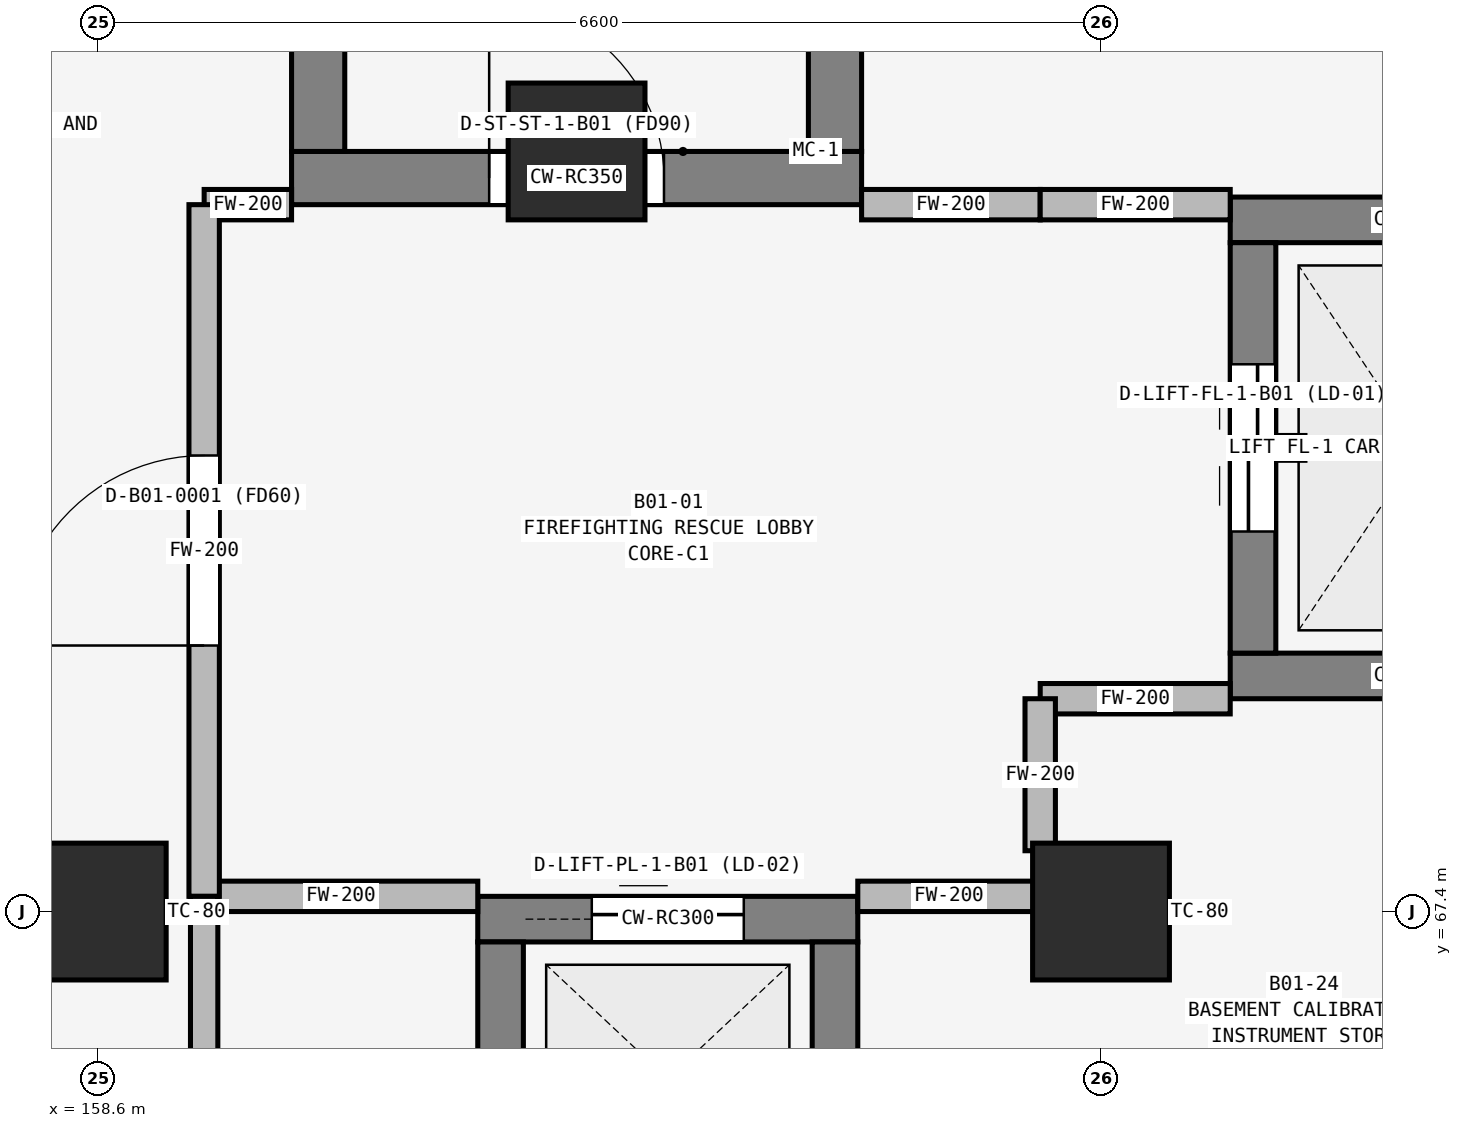
"""IFC4 building model, lengths in metres.
Left out: names, types, materials, properties, quantities, classifications, styles, units other than length and angle.
Written with IfcOpenShell. Run it as: python <this file> out.ifc"""

import sys

from ifc_helpers import new_model, si_unit, direction, frame, frame_2d, origin, origin_2d, place, context, subcontext, project, spatial, rectangle, extrude, element, fill, save


model = new_model("IFC4")
c1 = context("Model", 3, precision=1e-05, world=origin(), true_north=direction((0.0, 1.0)))
c2 = subcontext(c1, "Body", "Model", "MODEL_VIEW")
j1 = project(units=[si_unit("LENGTHUNIT", "METRE"), si_unit("PLANEANGLEUNIT", "RADIAN")], contexts=[c1])
p1 = place(None, origin())
s1 = spatial("IfcSite", under=j1, at=p1, CompositionType="ELEMENT")
p2 = place(p1, origin())
s2 = spatial("IfcBuilding", under=s1, at=p2, CompositionType="ELEMENT")
p3 = place(p2, frame((0.0, 0.0, -4.5)))
s3 = spatial("IfcBuildingStorey", under=s2, at=p3, CompositionType="ELEMENT", Elevation=-4.5)
for number, where, z_axis, x_axis in (
    (1, (158.6, 67.4, 0.0), (0.0, 0.0, 1.0), (1.0, 0.0, 0.0)),
    (2, (165.2, 67.4, 0.0), (0.0, 0.0, 1.0), (1.0, 0.0, 0.0)),
):
    element("IfcColumn", number, at=place(p3, frame(where, z_axis=z_axis, x_axis=x_axis)), inside=s3, PredefinedType="COLUMN", context=c2, shape_type="SweptSolid", body=[
        extrude(rectangle(XDim=0.8, YDim=0.8, at=origin_2d()), origin(), (0.0, 0.0, 1.0), 4.5),
    ])
p4 = place(p3, frame((159.875, 72.225, 0.0), z_axis=(0.0, 0.0, 1.0), x_axis=(1.0, 0.0, 0.0)))
e3 = element("IfcWall", 3, at=p4, inside=s3, PredefinedType="SHEAR", context=c2, shape_type="SweptSolid", body=[
    extrude(rectangle(XDim=3.75, YDim=0.35, at=frame_2d((1.875, 0.0))), origin(), (0.0, 0.0, 1.0), 4.5),
])
p5 = place(p4, frame((1.3, 0.0, 0.0)))
e4 = element("IfcOpeningElement", 4, at=p5, cuts=e3, PredefinedType="OPENING", context=c2, shape_type="SweptSolid", body=[
    extrude(rectangle(XDim=1.15, YDim=2.15, at=frame_2d((0.575, 1.075))), frame((0.0, 0.185, 0.0), z_axis=(0.0, -1.0, 0.0), x_axis=(1.0, 0.0, 0.0)), (0.0, 0.0, 1.0), 0.37),
])
for number, where, z_axis, x_axis in (
    (5, (160.05, 72.4, 0.0), (0.0, 0.0, 1.0), (0.0, 1.0, 0.0)),
    (6, (163.45, 72.4, 0.0), (0.0, 0.0, 1.0), (0.0, 1.0, 0.0)),
):
    element("IfcWall", number, at=place(p3, frame(where, z_axis=z_axis, x_axis=x_axis)), inside=s3, PredefinedType="SHEAR", context=c2, shape_type="SweptSolid", body=[
        extrude(rectangle(XDim=7.375, YDim=0.35, at=frame_2d((3.688, 0.0))), origin(), (0.0, 0.0, 1.0), 4.5),
    ])
for number, where, z_axis, x_axis in (
    (7, (166.05, 68.95, -0.82), (0.0, 0.0, 1.0), (1.0, 0.0, 0.0)),
    (8, (166.05, 71.95, -0.82), (0.0, 0.0, 1.0), (1.0, 0.0, 0.0)),
):
    element("IfcWall", number, at=place(p3, frame(where, z_axis=z_axis, x_axis=x_axis)), inside=s3, PredefinedType="SHEAR", context=c2, shape_type="SweptSolid", body=[
        extrude(rectangle(XDim=2.5, YDim=0.3, at=frame_2d((1.25, 0.0))), origin(), (0.0, 0.0, 1.0), 5.32),
    ])
p6 = place(p3, frame((166.2, 69.1, -0.82), z_axis=(0.0, 0.0, 1.0), x_axis=(0.0, 1.0, 0.0)))
e9 = element("IfcWall", 9, at=p6, inside=s3, PredefinedType="SHEAR", context=c2, shape_type="SweptSolid", body=[
    extrude(rectangle(XDim=2.7, YDim=0.3, at=frame_2d((1.35, 0.0))), origin(), (0.0, 0.0, 1.0), 5.32),
])
p7 = place(p6, frame((0.8, 0.0, 0.82)))
e10 = element("IfcOpeningElement", 10, at=p7, cuts=e9, PredefinedType="OPENING", context=c2, shape_type="SweptSolid", body=[
    extrude(rectangle(XDim=1.1, YDim=2.1, at=frame_2d((0.55, 1.05))), frame((0.0, 0.16, 0.0), z_axis=(0.0, -1.0, 0.0), x_axis=(1.0, 0.0, 0.0)), (0.0, 0.0, 1.0), 0.32),
])
p8 = place(p3, frame((161.1, 67.35, -0.82), z_axis=(0.0, 0.0, 1.0), x_axis=(1.0, 0.0, 0.0)))
e11 = element("IfcWall", 11, at=p8, inside=s3, PredefinedType="SHEAR", context=c2, shape_type="SweptSolid", body=[
    extrude(rectangle(XDim=2.5, YDim=0.3, at=frame_2d((1.25, 0.0))), origin(), (0.0, 0.0, 1.0), 5.32),
])
p9 = place(p8, frame((0.75, 0.0, 0.82)))
e12 = element("IfcOpeningElement", 12, at=p9, cuts=e11, PredefinedType="OPENING", context=c2, shape_type="SweptSolid", body=[
    extrude(rectangle(XDim=1.0, YDim=2.1, at=frame_2d((0.5, 1.05))), frame((0.0, 0.16, 0.0), z_axis=(0.0, -1.0, 0.0), x_axis=(1.0, 0.0, 0.0)), (0.0, 0.0, 1.0), 0.32),
])
for number, where, z_axis, x_axis in (
    (13, (161.25, 65.4, -0.82), (0.0, 0.0, 1.0), (0.0, 1.0, 0.0)),
    (14, (163.45, 65.4, -0.82), (0.0, 0.0, 1.0), (0.0, 1.0, 0.0)),
):
    element("IfcWall", number, at=place(p3, frame(where, z_axis=z_axis, x_axis=x_axis)), inside=s3, PredefinedType="SHEAR", context=c2, shape_type="SweptSolid", body=[
        extrude(rectangle(XDim=1.8, YDim=0.3, at=frame_2d((0.9, 0.0))), origin(), (0.0, 0.0, 1.0), 5.32),
    ])
for number, where, z_axis, x_axis in (
    (15, (158.6, 67.4, -1.2), (0.0, 0.0, 1.0), (1.0, 0.0, 0.0)),
    (16, (161.75, 72.4, -1.2), (0.0, 0.0, 1.0), (1.0, 0.0, 0.0)),
    (17, (165.2, 67.4, -1.2), (0.0, 0.0, 1.0), (1.0, 0.0, 0.0)),
):
    element("IfcColumn", number, at=place(p3, frame(where, z_axis=z_axis, x_axis=x_axis)), inside=s3, PredefinedType="COLUMN", context=c2, shape_type="SweptSolid", body=[
        extrude(rectangle(XDim=0.9, YDim=0.9, at=origin_2d()), origin(), (0.0, 0.0, 1.0), 1.2),
    ])
p10 = place(p3, frame((159.3, 72.05, 0.0), z_axis=(0.0, 0.0, 1.0), x_axis=(1.0, 0.0, 0.0)))
e18 = element("IfcWall", 18, at=p10, inside=s3, PredefinedType="PARTITIONING", context=c2, shape_type="SweptSolid", body=[
    extrude(rectangle(XDim=0.575, YDim=0.2, at=frame_2d((0.288, 0.0))), origin(), (0.0, 0.0, 1.0), 4.175),
])
p11 = place(p3, frame((163.625, 72.05, 0.0), z_axis=(0.0, 0.0, 1.0), x_axis=(1.0, 0.0, 0.0)))
e19 = element("IfcWall", 19, at=p11, inside=s3, PredefinedType="PARTITIONING", context=c2, shape_type="SweptSolid", body=[
    extrude(rectangle(XDim=1.175, YDim=0.2, at=frame_2d((0.587, 0.0))), origin(), (0.0, 0.0, 1.0), 4.175),
])
for number, where, z_axis, x_axis in (
    (20, (164.8, 72.05, 0.0), (0.0, 0.0, 1.0), (1.0, 0.0, 0.0)),
    (21, (166.05, 68.8, 0.0), (0.0, 0.0, 1.0), (-1.0, 0.0, 0.0)),
):
    element("IfcWall", number, at=place(p3, frame(where, z_axis=z_axis, x_axis=x_axis)), inside=s3, PredefinedType="PARTITIONING", context=c2, shape_type="SweptSolid", body=[
        extrude(rectangle(XDim=1.25, YDim=0.2, at=frame_2d((0.625, 0.0))), origin(), (0.0, 0.0, 1.0), 3.635),
    ])
p12 = place(p3, frame((164.8, 68.8, 0.0), z_axis=(0.0, 0.0, 1.0), x_axis=(0.0, -1.0, 0.0)))
e22 = element("IfcWall", 22, at=p12, inside=s3, PredefinedType="PARTITIONING", context=c2, shape_type="SweptSolid", body=[
    extrude(rectangle(XDim=1.0, YDim=0.2, at=frame_2d((0.5, 0.0))), origin(), (0.0, 0.0, 1.0), 4.175),
])
p13 = place(p3, frame((164.8, 67.5, 0.0), z_axis=(0.0, 0.0, 1.0), x_axis=(-1.0, 0.0, 0.0)))
e23 = element("IfcWall", 23, at=p13, inside=s3, PredefinedType="PARTITIONING", context=c2, shape_type="SweptSolid", body=[
    extrude(rectangle(XDim=1.2, YDim=0.2, at=frame_2d((0.6, 0.0))), origin(), (0.0, 0.0, 1.0), 3.835),
])
p14 = place(p3, frame((161.1, 67.5, 0.0), z_axis=(0.0, 0.0, 1.0), x_axis=(-1.0, 0.0, 0.0)))
e24 = element("IfcWall", 24, at=p14, inside=s3, PredefinedType="PARTITIONING", context=c2, shape_type="SweptSolid", body=[
    extrude(rectangle(XDim=1.8, YDim=0.2, at=frame_2d((0.9, 0.0))), origin(), (0.0, 0.0, 1.0), 3.835),
])
p15 = place(p3, frame((159.3, 67.5, 0.0), z_axis=(0.0, 0.0, 1.0), x_axis=(0.0, 1.0, 0.0)))
e25 = element("IfcWall", 25, at=p15, inside=s3, PredefinedType="PARTITIONING", context=c2, shape_type="SweptSolid", body=[
    extrude(rectangle(XDim=4.55, YDim=0.2, at=frame_2d((2.275, 0.0))), origin(), (0.0, 0.0, 1.0), 3.835),
])
p16 = place(p15, frame((1.65, 0.0, 0.0)))
e26 = element("IfcOpeningElement", 26, at=p16, cuts=e25, PredefinedType="OPENING", context=c2, shape_type="SweptSolid", body=[
    extrude(rectangle(XDim=1.25, YDim=2.15, at=frame_2d((0.625, 1.075))), frame((0.0, 0.11, 0.0), z_axis=(0.0, -1.0, 0.0), x_axis=(1.0, 0.0, 0.0)), (0.0, 0.0, 1.0), 0.22),
])
p17 = place(p3, frame((159.3, 65.05, 0.0), z_axis=(0.0, 0.0, 1.0), x_axis=(0.0, 1.0, 0.0)))
e27 = element("IfcWall", 27, at=p17, inside=s3, PredefinedType="PARTITIONING", context=c2, shape_type="SweptSolid", body=[
    extrude(rectangle(XDim=2.45, YDim=0.18, at=frame_2d((1.225, 0.0))), origin(), (0.0, 0.0, 1.0), 3.835),
])
p18 = place(p5, origin())
e28 = element("IfcDoor", 28, at=p18, inside=s3, OperationType="SINGLE_SWING_LEFT", PredefinedType="DOOR", context=c2, shape_type="SweptSolid", body=[
    extrude(rectangle(XDim=1.15, YDim=2.15, at=frame_2d((0.575, 1.075))), frame((0.0, 0.025, 0.0), z_axis=(0.0, -1.0, 0.0), x_axis=(1.0, 0.0, 0.0)), (0.0, 0.0, 1.0), 0.05),
])
fill(e4, e28)
p19 = place(p7, origin())
e29 = element("IfcDoor", 29, at=p19, inside=s3, OperationType="DOUBLE_DOOR_SLIDING", PredefinedType="DOOR", context=c2, shape_type="SweptSolid", body=[
    extrude(rectangle(XDim=1.1, YDim=2.1, at=frame_2d((0.55, 1.05))), frame((0.0, 0.025, 0.0), z_axis=(0.0, -1.0, 0.0), x_axis=(1.0, 0.0, 0.0)), (0.0, 0.0, 1.0), 0.05),
])
fill(e10, e29)
p20 = place(p9, origin())
e30 = element("IfcDoor", 30, at=p20, inside=s3, OperationType="SLIDING_TO_LEFT", PredefinedType="DOOR", context=c2, shape_type="SweptSolid", body=[
    extrude(rectangle(XDim=1.0, YDim=2.1, at=frame_2d((0.5, 1.05))), frame((0.0, 0.025, 0.0), z_axis=(0.0, -1.0, 0.0), x_axis=(1.0, 0.0, 0.0)), (0.0, 0.0, 1.0), 0.05),
])
fill(e12, e30)
p21 = place(p16, origin())
e31 = element("IfcDoor", 31, at=p21, inside=s3, OperationType="SINGLE_SWING_LEFT", PredefinedType="DOOR", context=c2, shape_type="SweptSolid", body=[
    extrude(rectangle(XDim=1.25, YDim=2.15, at=frame_2d((0.625, 1.075))), frame((0.0, 0.025, 0.0), z_axis=(0.0, -1.0, 0.0), x_axis=(1.0, 0.0, 0.0)), (0.0, 0.0, 1.0), 0.05),
])
fill(e26, e31)
save(model, sys.argv[1])
